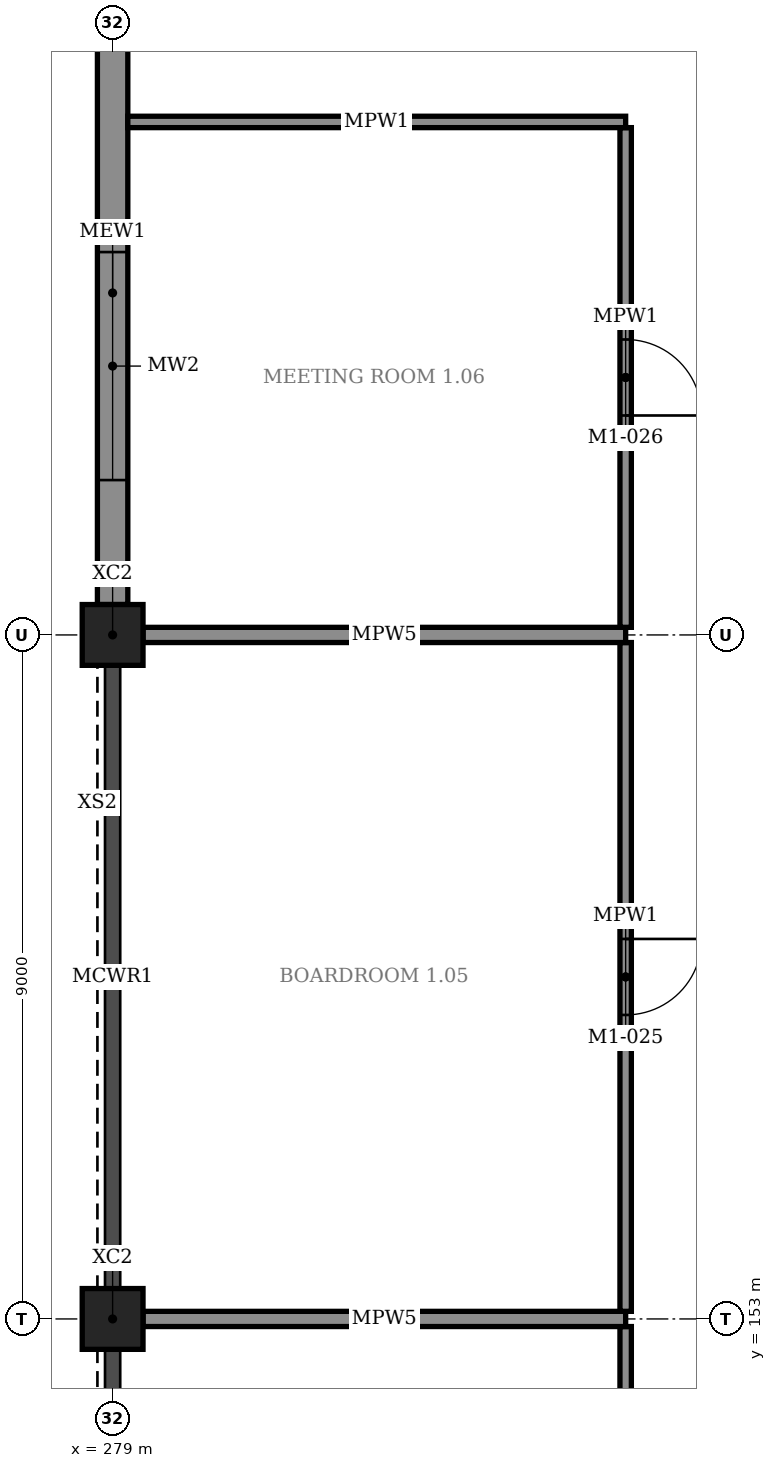
"""IFC4 building model, lengths in metres.
Left out: names, types, materials, properties, quantities, classifications, styles, units other than length and angle.
Written with IfcOpenShell. Run it as: python <this file> out.ifc"""

import sys

from ifc_helpers import new_model, si_unit, direction, frame, frame_2d, origin, origin_2d, place, context, subcontext, project, spatial, rectangle, extrude, element, fill, save


model = new_model("IFC4")
c1 = context("Model", 3, precision=1e-05, world=origin(), true_north=direction((0.0, 1.0)))
c2 = subcontext(c1, "Body", "Model", "MODEL_VIEW")
j1 = project(units=[si_unit("LENGTHUNIT", "METRE"), si_unit("PLANEANGLEUNIT", "RADIAN")], contexts=[c1])
p1 = place(None, origin())
s1 = spatial("IfcSite", under=j1, at=p1, CompositionType="ELEMENT")
p2 = place(p1, origin())
s2 = spatial("IfcBuilding", under=s1, at=p2, CompositionType="ELEMENT")
p3 = place(p2, frame((0.0, 0.0, 6.0)))
s3 = spatial("IfcBuildingStorey", under=s2, at=p3, CompositionType="ELEMENT", Elevation=6.0)
for number, where, z_axis, x_axis in (
    (1, (279.0, 153.0, 0.0), (0.0, 0.0, 1.0), (1.0, 0.0, 0.0)),
    (2, (279.0, 162.0, 0.0), (0.0, 0.0, 1.0), (1.0, 0.0, 0.0)),
):
    element("IfcColumn", number, at=place(p3, frame(where, z_axis=z_axis, x_axis=x_axis)), inside=s3, PredefinedType="COLUMN", context=c2, shape_type="SweptSolid", body=[
        extrude(rectangle(XDim=0.8, YDim=0.8, at=origin_2d()), origin(), (0.0, 0.0, 1.0), 5.5),
    ])
p4 = place(p3, frame((279.0, 162.4, 0.0), z_axis=(0.0, 0.0, 1.0), x_axis=(0.0, 1.0, 0.0)))
e3 = element("IfcWall", 3, at=p4, inside=s3, PredefinedType="STANDARD", context=c2, shape_type="SweptSolid", body=[
    extrude(rectangle(XDim=8.2, YDim=0.4, at=frame_2d((4.1, 0.0))), origin(), (0.0, 0.0, 1.0), 4.32),
])
p5 = place(p4, frame((1.638, 0.0, 0.9)))
e4 = element("IfcOpeningElement", 4, at=p5, cuts=e3, PredefinedType="OPENING", context=c2, shape_type="SweptSolid", body=[
    extrude(rectangle(XDim=3.0, YDim=2.1, at=frame_2d((1.5, 1.05))), frame((0.0, 0.21, 0.0), z_axis=(0.0, -1.0, 0.0), x_axis=(1.0, 0.0, 0.0)), (0.0, 0.0, 1.0), 0.42),
])
p6 = place(p3, frame((279.4, 153.0, 0.0), z_axis=(0.0, 0.0, 1.0), x_axis=(1.0, 0.0, 0.0)))
e5 = element("IfcWall", 5, at=p6, inside=s3, PredefinedType="PARTITIONING", context=c2, shape_type="SweptSolid", body=[
    extrude(rectangle(XDim=6.35, YDim=0.2, at=frame_2d((3.175, 0.0))), origin(), (0.0, 0.0, 1.0), 4.32),
])
p7 = place(p3, frame((285.75, 135.1, 0.0), z_axis=(0.0, 0.0, 1.0), x_axis=(0.0, 1.0, 0.0)))
e6 = element("IfcWall", 6, at=p7, inside=s3, PredefinedType="PARTITIONING", context=c2, shape_type="SweptSolid", body=[
    extrude(rectangle(XDim=17.8, YDim=0.15, at=frame_2d((8.9, 0.0))), origin(), (0.0, 0.0, 1.0), 4.32),
])
p8 = place(p7, frame((8.0, 0.0, 0.0)))
e7 = element("IfcOpeningElement", 7, at=p8, cuts=e6, PredefinedType="OPENING", context=c2, shape_type="SweptSolid", body=[
    extrude(rectangle(XDim=1.8, YDim=2.4, at=frame_2d((0.9, 1.2))), frame((0.0, 0.085, 0.0), z_axis=(0.0, -1.0, 0.0), x_axis=(1.0, 0.0, 0.0)), (0.0, 0.0, 1.0), 0.17),
])
p9 = place(p3, frame((279.4, 162.0, 0.0), z_axis=(0.0, 0.0, 1.0), x_axis=(1.0, 0.0, 0.0)))
e8 = element("IfcWall", 8, at=p9, inside=s3, PredefinedType="PARTITIONING", context=c2, shape_type="SweptSolid", body=[
    extrude(rectangle(XDim=6.35, YDim=0.2, at=frame_2d((3.175, 0.0))), origin(), (0.0, 0.0, 1.0), 4.32),
])
p10 = place(p3, frame((285.75, 153.1, 0.0), z_axis=(0.0, 0.0, 1.0), x_axis=(0.0, 1.0, 0.0)))
e9 = element("IfcWall", 9, at=p10, inside=s3, PredefinedType="PARTITIONING", context=c2, shape_type="SweptSolid", body=[
    extrude(rectangle(XDim=8.8, YDim=0.15, at=frame_2d((4.4, 0.0))), origin(), (0.0, 0.0, 1.0), 4.32),
])
p11 = place(p10, frame((3.9, 0.0, 0.0)))
e10 = element("IfcOpeningElement", 10, at=p11, cuts=e9, PredefinedType="OPENING", context=c2, shape_type="SweptSolid", body=[
    extrude(rectangle(XDim=1.0, YDim=2.4, at=frame_2d((0.5, 1.2))), frame((0.0, 0.085, 0.0), z_axis=(0.0, -1.0, 0.0), x_axis=(1.0, 0.0, 0.0)), (0.0, 0.0, 1.0), 0.17),
])
p12 = place(p3, frame((279.2, 168.75, 0.0), z_axis=(0.0, 0.0, 1.0), x_axis=(1.0, 0.0, 0.0)))
e11 = element("IfcWall", 11, at=p12, inside=s3, PredefinedType="PARTITIONING", context=c2, shape_type="SweptSolid", body=[
    extrude(rectangle(XDim=6.55, YDim=0.15, at=frame_2d((3.275, 0.0))), origin(), (0.0, 0.0, 1.0), 4.32),
])
p13 = place(p3, frame((285.75, 162.1, 0.0), z_axis=(0.0, 0.0, 1.0), x_axis=(0.0, 1.0, 0.0)))
e12 = element("IfcWall", 12, at=p13, inside=s3, PredefinedType="PARTITIONING", context=c2, shape_type="SweptSolid", body=[
    extrude(rectangle(XDim=6.575, YDim=0.15, at=frame_2d((3.288, 0.0))), origin(), (0.0, 0.0, 1.0), 4.32),
])
p14 = place(p13, frame((2.787, 0.0, 0.0)))
e13 = element("IfcOpeningElement", 13, at=p14, cuts=e12, PredefinedType="OPENING", context=c2, shape_type="SweptSolid", body=[
    extrude(rectangle(XDim=1.0, YDim=2.4, at=frame_2d((0.5, 1.2))), frame((0.0, 0.085, 0.0), z_axis=(0.0, -1.0, 0.0), x_axis=(1.0, 0.0, 0.0)), (0.0, 0.0, 1.0), 0.17),
])
p15 = place(p5, origin())
e14 = element("IfcWindow", 14, at=p15, inside=s3, PartitioningType="TRIPLE_PANEL_VERTICAL", PredefinedType="WINDOW", context=c2, shape_type="SweptSolid", body=[
    extrude(rectangle(XDim=3.0, YDim=2.1, at=frame_2d((1.5, 1.05))), frame((0.0, 0.03, 0.0), z_axis=(0.0, -1.0, 0.0), x_axis=(1.0, 0.0, 0.0)), (0.0, 0.0, 1.0), 0.06),
])
fill(e4, e14)
p16 = place(p11, frame((1.0, 0.0, 0.0), z_axis=(0.0, 0.0, 1.0), x_axis=(-1.0, 0.0, 0.0)))
e15 = element("IfcDoor", 15, at=p16, inside=s3, OperationType="SINGLE_SWING_RIGHT", PredefinedType="DOOR", context=c2, shape_type="SweptSolid", body=[
    extrude(rectangle(XDim=1.0, YDim=2.4, at=frame_2d((0.5, 1.2))), frame((0.0, 0.025, 0.0), z_axis=(0.0, -1.0, 0.0), x_axis=(1.0, 0.0, 0.0)), (0.0, 0.0, 1.0), 0.05),
])
fill(e10, e15)
p17 = place(p14, frame((1.0, 0.0, 0.0), z_axis=(0.0, 0.0, 1.0), x_axis=(-1.0, 0.0, 0.0)))
e16 = element("IfcDoor", 16, at=p17, inside=s3, OperationType="SINGLE_SWING_LEFT", PredefinedType="DOOR", context=c2, shape_type="SweptSolid", body=[
    extrude(rectangle(XDim=1.0, YDim=2.4, at=frame_2d((0.5, 1.2))), frame((0.0, 0.025, 0.0), z_axis=(0.0, -1.0, 0.0), x_axis=(1.0, 0.0, 0.0)), (0.0, 0.0, 1.0), 0.05),
])
fill(e13, e16)
save(model, sys.argv[1])
